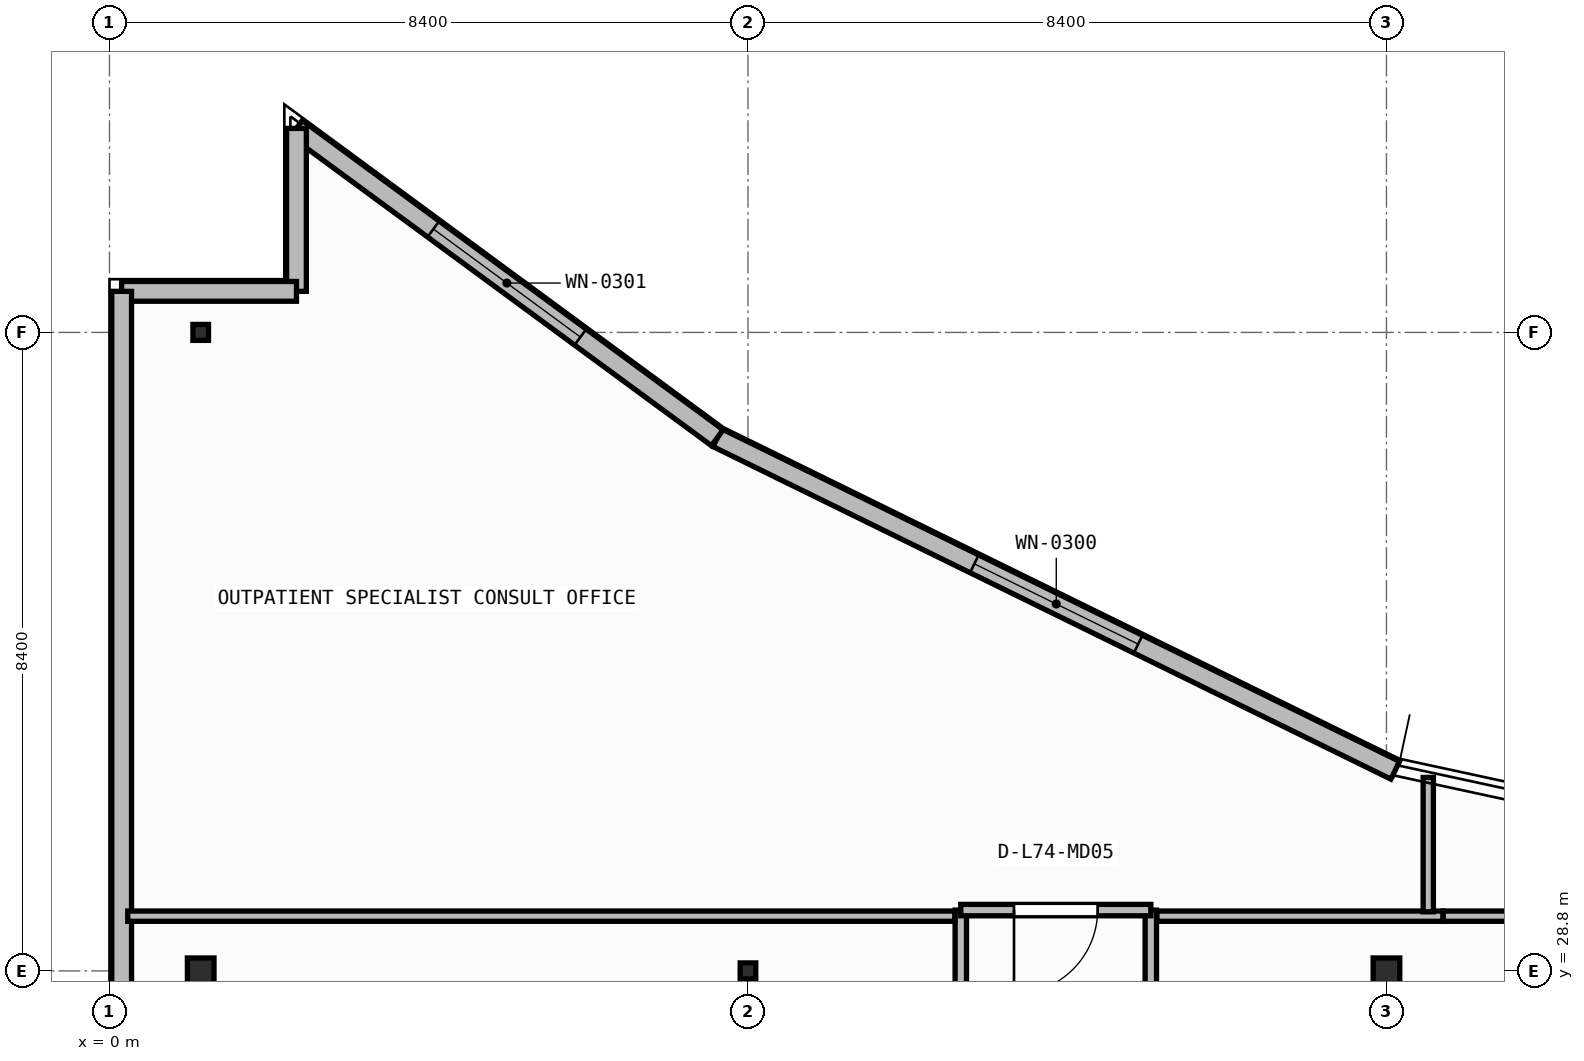
"""IFC4 building model, lengths in metres.
Left out: names, types, materials, properties, quantities, classifications, styles, units other than length and angle.
Written with IfcOpenShell. Run it as: python <this file> out.ifc"""

import sys

from ifc_helpers import new_model, si_unit, direction, frame, frame_2d, origin, origin_2d, place, context, subcontext, project, spatial, rectangle, i_section, extrude, element, fill, save


model = new_model("IFC4")
c1 = context("Model", 3, precision=1e-05, world=origin(), true_north=direction((0.0, 1.0)))
c2 = subcontext(c1, "Body", "Model", "MODEL_VIEW")
j1 = project(units=[si_unit("LENGTHUNIT", "METRE"), si_unit("PLANEANGLEUNIT", "RADIAN")], contexts=[c1])
p1 = place(None, origin())
s1 = spatial("IfcSite", under=j1, at=p1, CompositionType="ELEMENT")
p2 = place(p1, origin())
s2 = spatial("IfcBuilding", under=s1, at=p2, CompositionType="ELEMENT")
p3 = place(p2, frame((0.0, 0.0, 300.0)))
s3 = spatial("IfcBuildingStorey", under=s2, at=p3, CompositionType="ELEMENT", Elevation=300.0)
p4 = place(p3, frame((1.2, 28.8, 0.0), z_axis=(0.0, 0.0, 1.0), x_axis=(1.0, 0.0, 0.0)))
e1 = element("IfcColumn", 1, at=p4, inside=s3, PredefinedType="COLUMN", context=c2, shape_type="SweptSolid", body=[
    extrude(i_section(OverallWidth=0.35, OverallDepth=0.34, WebThickness=0.016, FlangeThickness=0.028, at=origin_2d()), origin(), (0.0, 0.0, 1.0), 3.95),
])
p5 = place(p3, frame((8.4, 28.8, 0.0), z_axis=(0.0, 0.0, 1.0), x_axis=(1.0, 0.0, 0.0)))
e2 = element("IfcColumn", 2, at=p5, inside=s3, PredefinedType="COLUMN", context=c2, shape_type="SweptSolid", body=[
    extrude(i_section(OverallWidth=0.205, OverallDepth=0.21, WebThickness=0.009, FlangeThickness=0.014, FilletRadius=0.011, at=origin_2d()), origin(), (0.0, 0.0, 1.0), 3.95),
])
p6 = place(p3, frame((16.8, 28.8, 0.0), z_axis=(0.0, 0.0, 1.0), x_axis=(1.0, 0.0, 0.0)))
e3 = element("IfcColumn", 3, at=p6, inside=s3, PredefinedType="COLUMN", context=c2, shape_type="SweptSolid", body=[
    extrude(i_section(OverallWidth=0.35, OverallDepth=0.34, WebThickness=0.016, FlangeThickness=0.028, at=origin_2d()), origin(), (0.0, 0.0, 1.0), 3.95),
])
p7 = place(p3, frame((1.2, 37.2, 0.0), z_axis=(0.0, 0.0, 1.0), x_axis=(1.0, 0.0, 0.0)))
e4 = element("IfcColumn", 4, at=p7, inside=s3, PredefinedType="COLUMN", context=c2, shape_type="SweptSolid", body=[
    extrude(i_section(OverallWidth=0.205, OverallDepth=0.21, WebThickness=0.009, FlangeThickness=0.014, FilletRadius=0.011, at=origin_2d()), origin(), (0.0, 0.0, 1.0), 3.95),
])
p8 = place(p3, frame((16.915, 31.44, 0.0), z_axis=(0.0, 0.0, 1.0), x_axis=(-0.897793077248, 0.440417518322, 0.0)))
e5 = element("IfcWall", 5, at=p8, inside=s3, PredefinedType="STANDARD", context=c2, shape_type="SweptSolid", body=[
    extrude(rectangle(XDim=9.934, YDim=0.26, at=frame_2d((4.967, 0.0))), origin(), (0.0, 0.0, 1.0), 3.67),
])
p9 = place(p8, frame((3.767, 0.0, 0.9)))
e6 = element("IfcOpeningElement", 6, at=p9, cuts=e5, PredefinedType="OPENING", context=c2, shape_type="SweptSolid", body=[
    extrude(rectangle(XDim=2.4, YDim=1.65, at=frame_2d((1.2, 0.825))), frame((0.0, 0.14, 0.0), z_axis=(0.0, -1.0, 0.0), x_axis=(1.0, 0.0, 0.0)), (0.0, 0.0, 1.0), 0.28),
])
p10 = place(p3, frame((7.997, 35.815, 0.0), z_axis=(0.0, 0.0, 1.0), x_axis=(-0.805786654178, 0.592205933733, 0.0)))
e7 = element("IfcWall", 7, at=p10, inside=s3, PredefinedType="STANDARD", context=c2, shape_type="SweptSolid", body=[
    extrude(rectangle(XDim=6.871, YDim=0.26, at=frame_2d((3.436, 0.0))), origin(), (0.0, 0.0, 1.0), 3.67),
])
p11 = place(p10, frame((2.236, 0.0, 0.9)))
e8 = element("IfcOpeningElement", 8, at=p11, cuts=e7, PredefinedType="OPENING", context=c2, shape_type="SweptSolid", body=[
    extrude(rectangle(XDim=2.4, YDim=1.65, at=frame_2d((1.2, 0.825))), frame((0.0, 0.14, 0.0), z_axis=(0.0, -1.0, 0.0), x_axis=(1.0, 0.0, 0.0)), (0.0, 0.0, 1.0), 0.28),
])
p12 = place(p3, frame((2.46, 39.884, 0.0), z_axis=(0.0, 0.0, 1.0), x_axis=(0.0, -1.0, 0.0)))
e9 = element("IfcWall", 9, at=p12, inside=s3, PredefinedType="STANDARD", context=c2, shape_type="SweptSolid", body=[
    extrude(rectangle(XDim=2.144, YDim=0.26, at=frame_2d((1.072, 0.0))), origin(), (0.0, 0.0, 1.0), 3.67),
])
p13 = place(p3, frame((2.46, 37.74, 0.0), z_axis=(0.0, 0.0, 1.0), x_axis=(-1.0, 0.0, 0.0)))
e10 = element("IfcWall", 10, at=p13, inside=s3, PredefinedType="STANDARD", context=c2, shape_type="SweptSolid", body=[
    extrude(rectangle(XDim=2.3, YDim=0.26, at=frame_2d((1.15, 0.0))), origin(), (0.0, 0.0, 1.0), 3.67),
])
p14 = place(p3, frame((0.16, 37.74, 0.0), z_axis=(0.0, 0.0, 1.0), x_axis=(0.0, -1.0, 0.0)))
e11 = element("IfcWall", 11, at=p14, inside=s3, PredefinedType="STANDARD", context=c2, shape_type="SweptSolid", body=[
    extrude(rectangle(XDim=35.28, YDim=0.26, at=frame_2d((17.64, 0.0))), origin(), (0.0, 0.0, 1.0), 3.67),
])
p15 = place(p14, frame((27.77, 0.0, 0.0)))
e12 = element("IfcOpeningElement", 12, at=p15, cuts=e11, PredefinedType="OPENING", context=c2, shape_type="SweptSolid", body=[
    extrude(rectangle(XDim=1.3, YDim=2.15, at=frame_2d((0.65, 1.075))), frame((0.0, 0.14, 0.0), z_axis=(0.0, -1.0, 0.0), x_axis=(1.0, 0.0, 0.0)), (0.0, 0.0, 1.0), 0.28),
])
p16 = place(p3, frame((11.2, 29.6, 0.0), z_axis=(0.0, 0.0, 1.0), x_axis=(0.0, -1.0, 0.0)))
e13 = element("IfcWall", 13, at=p16, inside=s3, PredefinedType="PARTITIONING", context=c2, shape_type="SweptSolid", body=[
    extrude(rectangle(XDim=7.232, YDim=0.15, at=frame_2d((3.616, 0.0))), origin(), (0.0, 0.0, 1.0), 3.67),
])
p17 = place(p16, frame((3.066, 0.0, 0.0)))
e14 = element("IfcOpeningElement", 14, at=p17, cuts=e13, PredefinedType="OPENING", context=c2, shape_type="SweptSolid", body=[
    extrude(rectangle(XDim=1.1, YDim=2.1, at=frame_2d((0.55, 1.05))), frame((0.0, 0.085, 0.0), z_axis=(0.0, -1.0, 0.0), x_axis=(1.0, 0.0, 0.0)), (0.0, 0.0, 1.0), 0.17),
])
p18 = place(p3, frame((13.7, 19.968, 0.0), z_axis=(0.0, 0.0, 1.0), x_axis=(0.0, 1.0, 0.0)))
e15 = element("IfcWall", 15, at=p18, inside=s3, PredefinedType="PARTITIONING", context=c2, shape_type="SweptSolid", body=[
    extrude(rectangle(XDim=9.632, YDim=0.15, at=frame_2d((4.816, 0.0))), origin(), (0.0, 0.0, 1.0), 3.67),
])
p19 = place(p18, frame((4.266, 0.0, 0.0)))
e16 = element("IfcOpeningElement", 16, at=p19, cuts=e15, PredefinedType="OPENING", context=c2, shape_type="SweptSolid", body=[
    extrude(rectangle(XDim=1.1, YDim=2.1, at=frame_2d((0.55, 1.05))), frame((0.0, 0.085, 0.0), z_axis=(0.0, -1.0, 0.0), x_axis=(1.0, 0.0, 0.0)), (0.0, 0.0, 1.0), 0.17),
])
p20 = place(p3, frame((13.7, 29.6, 0.0), z_axis=(0.0, 0.0, 1.0), x_axis=(-1.0, 0.0, 0.0)))
e17 = element("IfcWall", 17, at=p20, inside=s3, PredefinedType="PARTITIONING", context=c2, shape_type="SweptSolid", body=[
    extrude(rectangle(XDim=2.5, YDim=0.15, at=frame_2d((1.25, 0.0))), origin(), (0.0, 0.0, 1.0), 3.67),
])
p21 = place(p20, frame((0.7, 0.0, 0.0)))
e18 = element("IfcOpeningElement", 18, at=p21, cuts=e17, PredefinedType="OPENING", context=c2, shape_type="SweptSolid", body=[
    extrude(rectangle(XDim=1.1, YDim=2.1, at=frame_2d((0.55, 1.05))), frame((0.0, 0.085, 0.0), z_axis=(0.0, -1.0, 0.0), x_axis=(1.0, 0.0, 0.0)), (0.0, 0.0, 1.0), 0.17),
])
p22 = place(p3, frame((11.12, 29.52, 0.0), z_axis=(0.0, 0.0, 1.0), x_axis=(-1.0, 0.0, 0.0)))
e19 = element("IfcWall", 19, at=p22, inside=s3, PredefinedType="PARTITIONING", context=c2, shape_type="SweptSolid", body=[
    extrude(rectangle(XDim=10.88, YDim=0.135, at=frame_2d((5.44, 0.0))), origin(), (0.0, 0.0, 1.0), 3.67),
])
p23 = place(p3, frame((17.545, 29.52, 0.0), z_axis=(0.0, 0.0, 1.0), x_axis=(-1.0, 0.0, 0.0)))
e20 = element("IfcWall", 20, at=p23, inside=s3, PredefinedType="PARTITIONING", context=c2, shape_type="SweptSolid", body=[
    extrude(rectangle(XDim=3.765, YDim=0.135, at=frame_2d((1.882, 0.0))), origin(), (0.0, 0.0, 1.0), 3.67),
])
p24 = place(p3, frame((22.93, 29.52, 0.0), z_axis=(0.0, 0.0, 1.0), x_axis=(-1.0, 0.0, 0.0)))
e21 = element("IfcWall", 21, at=p24, inside=s3, PredefinedType="PARTITIONING", context=c2, shape_type="SweptSolid", body=[
    extrude(rectangle(XDim=5.383, YDim=0.135, at=frame_2d((2.692, 0.0))), origin(), (0.0, 0.0, 1.0), 3.67),
])
p25 = place(p24, frame((1.185, 0.0, 0.0)))
e22 = element("IfcOpeningElement", 22, at=p25, cuts=e21, PredefinedType="OPENING", context=c2, shape_type="SweptSolid", body=[
    extrude(rectangle(XDim=1.4, YDim=2.15, at=frame_2d((0.7, 1.075))), frame((0.0, 0.077, 0.0), z_axis=(0.0, -1.0, 0.0), x_axis=(1.0, 0.0, 0.0)), (0.0, 0.0, 1.0), 0.155),
])
p26 = place(p3, frame((17.35, 29.577, 0.0), z_axis=(0.0, 0.0, 1.0), x_axis=(0.0, 1.0, 0.0)))
e23 = element("IfcWall", 23, at=p26, inside=s3, PredefinedType="PARTITIONING", context=c2, shape_type="SweptSolid", body=[
    extrude(rectangle(XDim=1.768, YDim=0.135, at=frame_2d((0.884, 0.0))), origin(), (0.0, 0.0, 1.0), 3.67),
])
p27 = place(p9, origin())
e24 = element("IfcWindow", 24, at=p27, inside=s3, PartitioningType="SINGLE_PANEL", PredefinedType="WINDOW", context=c2, shape_type="SweptSolid", body=[
    extrude(rectangle(XDim=2.4, YDim=1.65, at=frame_2d((1.2, 0.825))), frame((0.0, 0.03, 0.0), z_axis=(0.0, -1.0, 0.0), x_axis=(1.0, 0.0, 0.0)), (0.0, 0.0, 1.0), 0.06),
])
fill(e6, e24)
p28 = place(p11, origin())
e25 = element("IfcWindow", 25, at=p28, inside=s3, PartitioningType="SINGLE_PANEL", PredefinedType="WINDOW", context=c2, shape_type="SweptSolid", body=[
    extrude(rectangle(XDim=2.4, YDim=1.65, at=frame_2d((1.2, 0.825))), frame((0.0, 0.03, 0.0), z_axis=(0.0, -1.0, 0.0), x_axis=(1.0, 0.0, 0.0)), (0.0, 0.0, 1.0), 0.06),
])
fill(e8, e25)
p29 = place(p21, origin())
e26 = element("IfcDoor", 26, at=p29, inside=s3, OperationType="SINGLE_SWING_RIGHT", PredefinedType="DOOR", context=c2, shape_type="SweptSolid", body=[
    extrude(rectangle(XDim=1.1, YDim=2.1, at=frame_2d((0.55, 1.05))), frame((0.0, 0.025, 0.0), z_axis=(0.0, -1.0, 0.0), x_axis=(1.0, 0.0, 0.0)), (0.0, 0.0, 1.0), 0.05),
])
fill(e18, e26)
save(model, sys.argv[1])
